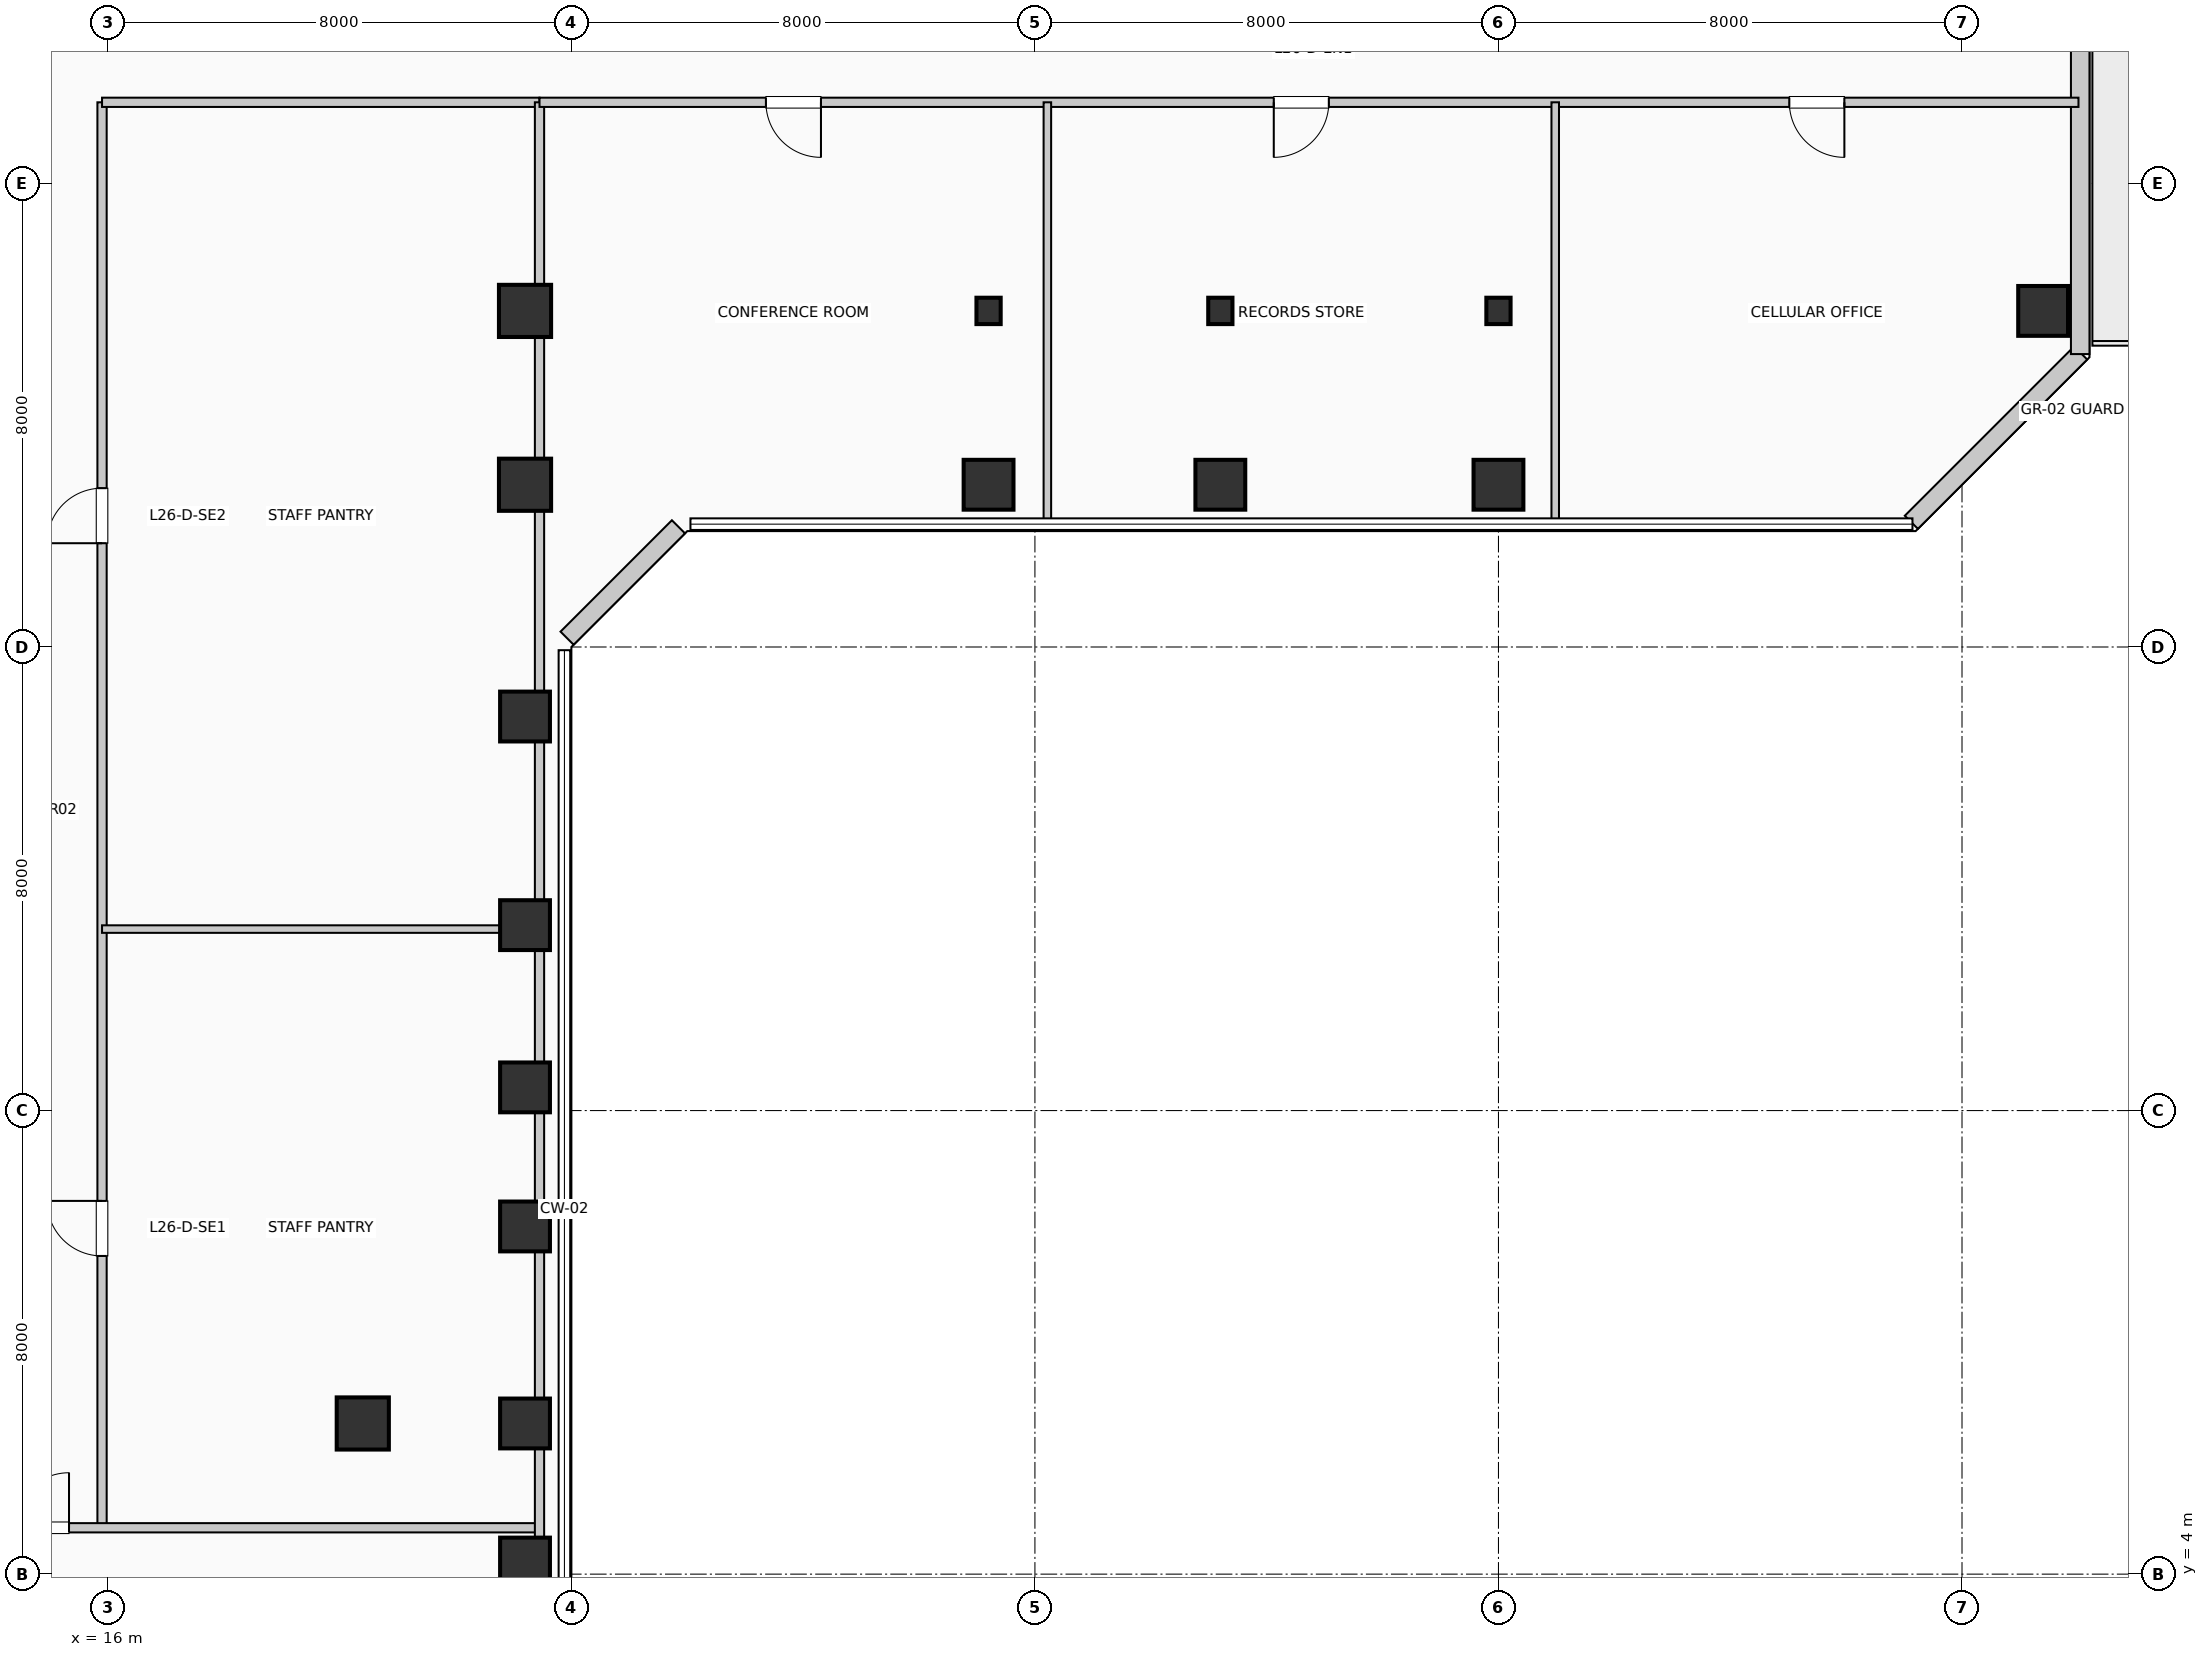
"""IFC4 building model, lengths in metres.
Left out: names, types, materials, properties, quantities, classifications, styles, units other than length and angle.
Written with IfcOpenShell. Run it as: python <this file> out.ifc"""

import sys

from ifc_helpers import new_model, si_unit, direction, frame, frame_2d, origin, origin_2d, place, context, subcontext, project, spatial, rectangle, i_section, extrude, element, fill, save


model = new_model("IFC4")
c1 = context("Model", 3, precision=1e-05, world=origin(), true_north=direction((0.0, 1.0)))
c2 = subcontext(c1, "Body", "Model", "MODEL_VIEW")
j1 = project(units=[si_unit("LENGTHUNIT", "METRE"), si_unit("PLANEANGLEUNIT", "RADIAN")], contexts=[c1])
p1 = place(None, origin())
s1 = spatial("IfcSite", under=j1, at=p1, CompositionType="ELEMENT")
p2 = place(p1, origin())
s2 = spatial("IfcBuilding", under=s1, at=p2, CompositionType="ELEMENT")
p3 = place(p2, frame((0.0, 0.0, 110.55)))
s3 = spatial("IfcBuildingStorey", under=s2, at=p3, CompositionType="ELEMENT", Elevation=110.55)
p4 = place(p3, frame((20.4, 6.6, 0.0), z_axis=(0.0, 0.0, 1.0), x_axis=(1.0, 0.0, 0.0)))
e1 = element("IfcColumn", 1, at=p4, inside=s3, PredefinedType="COLUMN", context=c2, shape_type="SweptSolid", body=[
    extrude(rectangle(XDim=0.9, YDim=0.9, at=origin_2d()), origin(), (0.0, 0.0, 1.0), 3.96),
])
for number, where, z_axis, x_axis in (
    (2, (23.2, 4.2, 0.0), (0.0, 0.0, 1.0), (1.0, 0.0, 0.0)),
    (3, (23.2, 6.6, 0.0), (0.0, 0.0, 1.0), (1.0, 0.0, 0.0)),
    (4, (23.2, 10.0, 0.0), (0.0, 0.0, 1.0), (1.0, 0.0, 0.0)),
    (5, (23.2, 12.4, 0.0), (0.0, 0.0, 1.0), (1.0, 0.0, 0.0)),
    (6, (23.2, 15.2, 0.0), (0.0, 0.0, 1.0), (1.0, 0.0, 0.0)),
    (7, (23.2, 18.8, 0.0), (0.0, 0.0, 1.0), (1.0, 0.0, 0.0)),
):
    element("IfcColumn", number, at=place(p3, frame(where, z_axis=z_axis, x_axis=x_axis)), inside=s3, PredefinedType="COLUMN", context=c2, shape_type="SweptSolid", body=[
        extrude(rectangle(XDim=0.86, YDim=0.86, at=origin_2d()), origin(), (0.0, 0.0, 1.0), 3.96),
    ])
for number, where, z_axis, x_axis in (
    (8, (23.2, 22.8, 0.0), (0.0, 0.0, 1.0), (1.0, 0.0, 0.0)),
    (9, (23.2, 25.8, 0.0), (0.0, 0.0, 1.0), (1.0, 0.0, 0.0)),
):
    element("IfcColumn", number, at=place(p3, frame(where, z_axis=z_axis, x_axis=x_axis)), inside=s3, PredefinedType="COLUMN", context=c2, shape_type="SweptSolid", body=[
        extrude(rectangle(XDim=0.9, YDim=0.9, at=origin_2d()), origin(), (0.0, 0.0, 1.0), 3.96),
    ])
p5 = place(p3, frame((31.2, 22.8, 0.0), z_axis=(0.0, 0.0, 1.0), x_axis=(1.0, 0.0, 0.0)))
e10 = element("IfcColumn", 10, at=p5, inside=s3, PredefinedType="COLUMN", context=c2, shape_type="SweptSolid", body=[
    extrude(rectangle(XDim=0.86, YDim=0.86, at=origin_2d()), origin(), (0.0, 0.0, 1.0), 3.96),
])
p6 = place(p3, frame((31.2, 25.8, 0.0), z_axis=(0.0, 0.0, 1.0), x_axis=(1.0, 0.0, 0.0)))
e11 = element("IfcColumn", 11, at=p6, inside=s3, PredefinedType="COLUMN", context=c2, shape_type="SweptSolid", body=[
    extrude(i_section(OverallWidth=0.418, OverallDepth=0.455, WebThickness=0.032, FlangeThickness=0.051, at=origin_2d()), origin(), (0.0, 0.0, 1.0), 3.96),
])
p7 = place(p3, frame((35.2, 22.8, 0.0), z_axis=(0.0, 0.0, 1.0), x_axis=(1.0, 0.0, 0.0)))
e12 = element("IfcColumn", 12, at=p7, inside=s3, PredefinedType="COLUMN", context=c2, shape_type="SweptSolid", body=[
    extrude(rectangle(XDim=0.86, YDim=0.86, at=origin_2d()), origin(), (0.0, 0.0, 1.0), 3.96),
])
p8 = place(p3, frame((35.2, 25.8, 0.0), z_axis=(0.0, 0.0, 1.0), x_axis=(1.0, 0.0, 0.0)))
e13 = element("IfcColumn", 13, at=p8, inside=s3, PredefinedType="COLUMN", context=c2, shape_type="SweptSolid", body=[
    extrude(i_section(OverallWidth=0.418, OverallDepth=0.455, WebThickness=0.032, FlangeThickness=0.051, at=origin_2d()), origin(), (0.0, 0.0, 1.0), 3.96),
])
p9 = place(p3, frame((40.0, 22.8, 0.0), z_axis=(0.0, 0.0, 1.0), x_axis=(1.0, 0.0, 0.0)))
e14 = element("IfcColumn", 14, at=p9, inside=s3, PredefinedType="COLUMN", context=c2, shape_type="SweptSolid", body=[
    extrude(rectangle(XDim=0.86, YDim=0.86, at=origin_2d()), origin(), (0.0, 0.0, 1.0), 3.96),
])
p10 = place(p3, frame((40.0, 25.8, 0.0), z_axis=(0.0, 0.0, 1.0), x_axis=(1.0, 0.0, 0.0)))
e15 = element("IfcColumn", 15, at=p10, inside=s3, PredefinedType="COLUMN", context=c2, shape_type="SweptSolid", body=[
    extrude(i_section(OverallWidth=0.418, OverallDepth=0.455, WebThickness=0.032, FlangeThickness=0.051, at=origin_2d()), origin(), (0.0, 0.0, 1.0), 3.96),
])
p11 = place(p3, frame((49.4, 25.8, 0.0), z_axis=(0.0, 0.0, 1.0), x_axis=(1.0, 0.0, 0.0)))
e16 = element("IfcColumn", 16, at=p11, inside=s3, PredefinedType="COLUMN", context=c2, shape_type="SweptSolid", body=[
    extrude(rectangle(XDim=0.86, YDim=0.86, at=origin_2d()), origin(), (0.0, 0.0, 1.0), 3.96),
])
p12 = place(p3, frame((23.926, 20.152, 0.0), z_axis=(0.0, 0.0, 1.0), x_axis=(0.707106781187, 0.707106781187, 0.0)))
e17 = element("IfcWall", 17, at=p12, inside=s3, PredefinedType="SOLIDWALL", context=c2, shape_type="SweptSolid", body=[
    extrude(rectangle(XDim=2.718, YDim=0.32, at=frame_2d((1.359, 0.0))), origin(), (0.0, 0.0, 1.0), 3.71),
])
p13 = place(p3, frame((47.126, 22.152, 0.0), z_axis=(0.0, 0.0, 1.0), x_axis=(0.707136318428, 0.707077242712, 0.0)))
e18 = element("IfcWall", 18, at=p13, inside=s3, PredefinedType="SOLIDWALL", context=c2, shape_type="SweptSolid", body=[
    extrude(rectangle(XDim=4.133, YDim=0.32, at=frame_2d((2.066, 0.0))), origin(), (0.0, 0.0, 1.0), 3.71),
])
p14 = place(p3, frame((50.04, 25.055, 0.0), z_axis=(0.0, 0.0, 1.0), x_axis=(0.0, 1.0, 0.0)))
e19 = element("IfcWall", 19, at=p14, inside=s3, PredefinedType="SOLIDWALL", context=c2, shape_type="SweptSolid", body=[
    extrude(rectangle(XDim=17.89, YDim=0.32, at=frame_2d((8.945, 0.0))), origin(), (0.0, 0.0, 1.0), 3.71),
])
p15 = place(p14, frame((13.381, 0.0, 0.0), z_axis=(0.0, 0.0, 1.0), x_axis=(-1.0, 0.0, 0.0)))
e20 = element("IfcOpeningElement", 20, at=p15, cuts=e19, PredefinedType="OPENING", context=c2, shape_type="SweptSolid", body=[
    extrude(rectangle(XDim=1.1, YDim=2.2, at=frame_2d((0.55, 1.1))), frame((0.0, 0.17, 0.0), z_axis=(0.0, -1.0, 0.0), x_axis=(1.0, 0.0, 0.0)), (0.0, 0.0, 1.0), 0.34),
])
p16 = place(p3, frame((15.9, 4.8, 0.0), z_axis=(0.0, 0.0, 1.0), x_axis=(0.0, 1.0, 0.0)))
e21 = element("IfcWall", 21, at=p16, inside=s3, PredefinedType="PARTITIONING", context=c2, shape_type="SweptSolid", body=[
    extrude(rectangle(XDim=24.6, YDim=0.16, at=frame_2d((12.3, 0.0))), origin(), (0.0, 0.0, 1.0), 3.71),
])
p17 = place(p16, frame((4.691, 0.0, 0.0)))
e22 = element("IfcOpeningElement", 22, at=p17, cuts=e21, PredefinedType="OPENING", context=c2, shape_type="SweptSolid", body=[
    extrude(rectangle(XDim=0.95, YDim=2.15, at=frame_2d((0.475, 1.075))), frame((0.0, 0.09, 0.0), z_axis=(0.0, -1.0, 0.0), x_axis=(1.0, 0.0, 0.0)), (0.0, 0.0, 1.0), 0.18),
])
p18 = place(p16, frame((16.991, 0.0, 0.0)))
e23 = element("IfcOpeningElement", 23, at=p18, cuts=e21, PredefinedType="OPENING", context=c2, shape_type="SweptSolid", body=[
    extrude(rectangle(XDim=0.95, YDim=2.15, at=frame_2d((0.475, 1.075))), frame((0.0, 0.09, 0.0), z_axis=(0.0, -1.0, 0.0), x_axis=(1.0, 0.0, 0.0)), (0.0, 0.0, 1.0), 0.18),
])
p19 = place(p3, frame((0.19, 4.8, 0.0), z_axis=(0.0, 0.0, 1.0), x_axis=(1.0, 0.0, 0.0)))
e24 = element("IfcWall", 24, at=p19, inside=s3, PredefinedType="PARTITIONING", context=c2, shape_type="SweptSolid", body=[
    extrude(rectangle(XDim=23.26, YDim=0.16, at=frame_2d((11.63, 0.0))), origin(), (0.0, 0.0, 1.0), 3.71),
])
p20 = place(p19, frame((14.19, 0.0, 0.0)))
e25 = element("IfcOpeningElement", 25, at=p20, cuts=e24, PredefinedType="OPENING", context=c2, shape_type="SweptSolid", body=[
    extrude(rectangle(XDim=0.95, YDim=2.15, at=frame_2d((0.475, 1.075))), frame((0.0, 0.09, 0.0), z_axis=(0.0, -1.0, 0.0), x_axis=(1.0, 0.0, 0.0)), (0.0, 0.0, 1.0), 0.18),
])
p21 = place(p3, frame((15.9, 29.4, 0.0), z_axis=(0.0, 0.0, 1.0), x_axis=(1.0, 0.0, 0.0)))
e26 = element("IfcWall", 26, at=p21, inside=s3, PredefinedType="PARTITIONING", context=c2, shape_type="SweptSolid", body=[
    extrude(rectangle(XDim=7.55, YDim=0.16, at=frame_2d((3.775, 0.0))), origin(), (0.0, 0.0, 1.0), 3.71),
])
p22 = place(p3, frame((23.45, 0.19, 0.0), z_axis=(0.0, 0.0, 1.0), x_axis=(0.0, 1.0, 0.0)))
e27 = element("IfcWall", 27, at=p22, inside=s3, PredefinedType="PARTITIONING", context=c2, shape_type="SweptSolid", body=[
    extrude(rectangle(XDim=29.21, YDim=0.16, at=frame_2d((14.605, 0.0))), origin(), (0.0, 0.0, 1.0), 3.045),
])
p23 = place(p3, frame((15.9, 15.132, 0.0), z_axis=(0.0, 0.0, 1.0), x_axis=(1.0, 0.0, 0.0)))
e28 = element("IfcWall", 28, at=p23, inside=s3, PredefinedType="PARTITIONING", context=c2, shape_type="SweptSolid", body=[
    extrude(rectangle(XDim=7.55, YDim=0.13, at=frame_2d((3.775, 0.0))), origin(), (0.0, 0.0, 1.0), 3.045),
])
p24 = place(p3, frame((23.45, 29.4, 0.0), z_axis=(0.0, 0.0, 1.0), x_axis=(1.0, 0.0, 0.0)))
e29 = element("IfcWall", 29, at=p24, inside=s3, PredefinedType="PARTITIONING", context=c2, shape_type="SweptSolid", body=[
    extrude(rectangle(XDim=26.56, YDim=0.16, at=frame_2d((13.28, 0.0))), origin(), (0.0, 0.0, 1.0), 3.365),
])
p25 = place(p24, frame((4.857, 0.0, 0.0), z_axis=(0.0, 0.0, 1.0), x_axis=(-1.0, 0.0, 0.0)))
e30 = element("IfcOpeningElement", 30, at=p25, cuts=e29, PredefinedType="OPENING", context=c2, shape_type="SweptSolid", body=[
    extrude(rectangle(XDim=0.95, YDim=2.15, at=frame_2d((0.475, 1.075))), frame((0.0, 0.09, 0.0), z_axis=(0.0, -1.0, 0.0), x_axis=(1.0, 0.0, 0.0)), (0.0, 0.0, 1.0), 0.18),
])
p26 = place(p24, frame((13.622, 0.0, 0.0), z_axis=(0.0, 0.0, 1.0), x_axis=(-1.0, 0.0, 0.0)))
e31 = element("IfcOpeningElement", 31, at=p26, cuts=e29, PredefinedType="OPENING", context=c2, shape_type="SweptSolid", body=[
    extrude(rectangle(XDim=0.95, YDim=2.15, at=frame_2d((0.475, 1.075))), frame((0.0, 0.09, 0.0), z_axis=(0.0, -1.0, 0.0), x_axis=(1.0, 0.0, 0.0)), (0.0, 0.0, 1.0), 0.18),
])
p27 = place(p24, frame((22.52, 0.0, 0.0), z_axis=(0.0, 0.0, 1.0), x_axis=(-1.0, 0.0, 0.0)))
e32 = element("IfcOpeningElement", 32, at=p27, cuts=e29, PredefinedType="OPENING", context=c2, shape_type="SweptSolid", body=[
    extrude(rectangle(XDim=0.95, YDim=2.15, at=frame_2d((0.475, 1.075))), frame((0.0, 0.09, 0.0), z_axis=(0.0, -1.0, 0.0), x_axis=(1.0, 0.0, 0.0)), (0.0, 0.0, 1.0), 0.18),
])
for number, where, z_axis, x_axis in (
    (33, (32.215, 22.19, 0.0), (0.0, 0.0, 1.0), (0.0, 1.0, 0.0)),
    (34, (40.979, 22.19, 0.0), (0.0, 0.0, 1.0), (0.0, 1.0, 0.0)),
):
    element("IfcWall", number, at=place(p3, frame(where, z_axis=z_axis, x_axis=x_axis)), inside=s3, PredefinedType="PARTITIONING", context=c2, shape_type="SweptSolid", body=[
        extrude(rectangle(XDim=7.21, YDim=0.13, at=frame_2d((3.605, 0.0))), origin(), (0.0, 0.0, 1.0), 3.71),
    ])
p28 = place(p20, origin())
e35 = element("IfcDoor", 35, at=p28, inside=s3, OperationType="SINGLE_SWING_RIGHT", PredefinedType="DOOR", context=c2, shape_type="SweptSolid", body=[
    extrude(rectangle(XDim=0.95, YDim=2.15, at=frame_2d((0.475, 1.075))), frame((0.0, 0.025, 0.0), z_axis=(0.0, -1.0, 0.0), x_axis=(1.0, 0.0, 0.0)), (0.0, 0.0, 1.0), 0.05),
])
fill(e25, e35)
p29 = place(p17, origin())
e36 = element("IfcDoor", 36, at=p29, inside=s3, OperationType="SINGLE_SWING_RIGHT", PredefinedType="DOOR", context=c2, shape_type="SweptSolid", body=[
    extrude(rectangle(XDim=0.95, YDim=2.15, at=frame_2d((0.475, 1.075))), frame((0.0, 0.025, 0.0), z_axis=(0.0, -1.0, 0.0), x_axis=(1.0, 0.0, 0.0)), (0.0, 0.0, 1.0), 0.05),
])
fill(e22, e36)
p30 = place(p18, origin())
e37 = element("IfcDoor", 37, at=p30, inside=s3, OperationType="SINGLE_SWING_LEFT", PredefinedType="DOOR", context=c2, shape_type="SweptSolid", body=[
    extrude(rectangle(XDim=0.95, YDim=2.15, at=frame_2d((0.475, 1.075))), frame((0.0, 0.025, 0.0), z_axis=(0.0, -1.0, 0.0), x_axis=(1.0, 0.0, 0.0)), (0.0, 0.0, 1.0), 0.05),
])
fill(e23, e37)
p31 = place(p25, origin())
e38 = element("IfcDoor", 38, at=p31, inside=s3, OperationType="SINGLE_SWING_RIGHT", PredefinedType="DOOR", context=c2, shape_type="SweptSolid", body=[
    extrude(rectangle(XDim=0.95, YDim=2.15, at=frame_2d((0.475, 1.075))), frame((0.0, 0.025, 0.0), z_axis=(0.0, -1.0, 0.0), x_axis=(1.0, 0.0, 0.0)), (0.0, 0.0, 1.0), 0.05),
])
fill(e30, e38)
p32 = place(p26, origin())
e39 = element("IfcDoor", 39, at=p32, inside=s3, OperationType="SINGLE_SWING_LEFT", PredefinedType="DOOR", context=c2, shape_type="SweptSolid", body=[
    extrude(rectangle(XDim=0.95, YDim=2.15, at=frame_2d((0.475, 1.075))), frame((0.0, 0.025, 0.0), z_axis=(0.0, -1.0, 0.0), x_axis=(1.0, 0.0, 0.0)), (0.0, 0.0, 1.0), 0.05),
])
fill(e31, e39)
p33 = place(p27, origin())
e40 = element("IfcDoor", 40, at=p33, inside=s3, OperationType="SINGLE_SWING_RIGHT", PredefinedType="DOOR", context=c2, shape_type="SweptSolid", body=[
    extrude(rectangle(XDim=0.95, YDim=2.15, at=frame_2d((0.475, 1.075))), frame((0.0, 0.025, 0.0), z_axis=(0.0, -1.0, 0.0), x_axis=(1.0, 0.0, 0.0)), (0.0, 0.0, 1.0), 0.05),
])
fill(e32, e40)
save(model, sys.argv[1])
